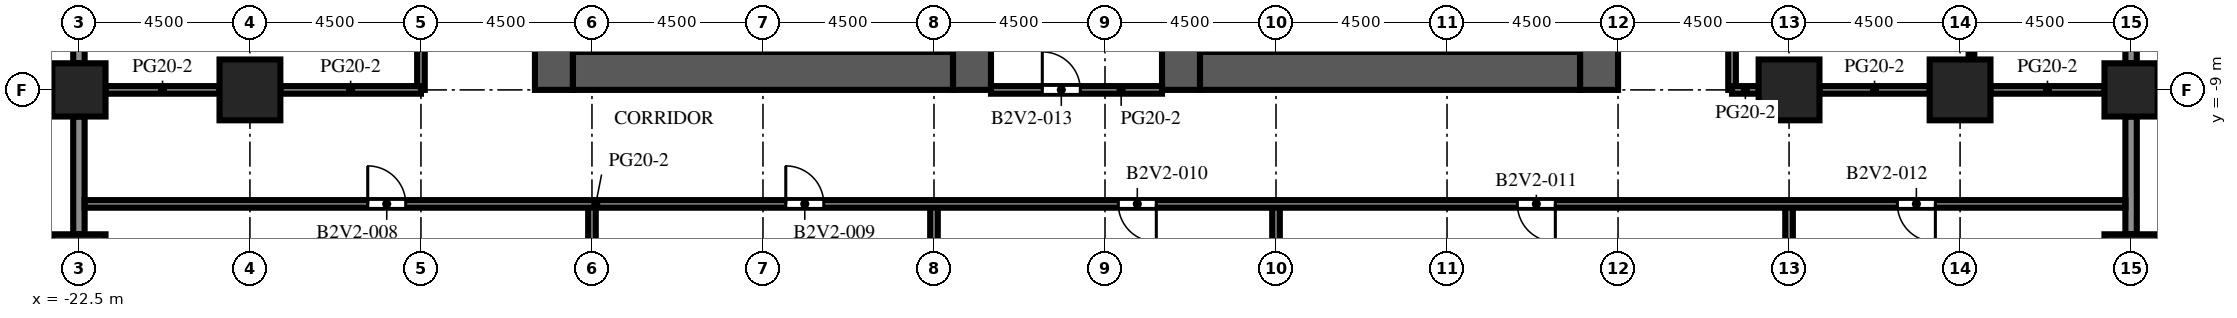
"""IFC4 building model, lengths in metres.
Left out: names, types, materials, properties, quantities, classifications, styles, units other than length and angle.
Written with IfcOpenShell. Run it as: python <this file> out.ifc"""

import sys

from ifc_helpers import new_model, si_unit, direction, frame, frame_2d, origin, origin_2d, place, context, subcontext, project, spatial, rectangle, extrude, element, fill, save


model = new_model("IFC4")
c1 = context("Model", 3, precision=1e-05, world=origin(), true_north=direction((0.0, 1.0)))
c2 = subcontext(c1, "Body", "Model", "MODEL_VIEW")
j1 = project(units=[si_unit("LENGTHUNIT", "METRE"), si_unit("PLANEANGLEUNIT", "RADIAN")], contexts=[c1])
p1 = place(None, origin())
s1 = spatial("IfcSite", under=j1, at=p1, CompositionType="ELEMENT")
p2 = place(p1, origin())
s2 = spatial("IfcBuilding", under=s1, at=p2, CompositionType="ELEMENT")
p3 = place(p2, frame((0.0, 0.0, 66.5)))
s3 = spatial("IfcBuildingStorey", under=s2, at=p3, CompositionType="ELEMENT", Elevation=66.5)
for number, where, z_axis, x_axis in (
    (1, (-22.5, -13.5, 0.0), (0.0, 0.0, 1.0), (1.0, 0.0, 0.0)),
    (2, (-22.5, -9.0, 0.0), (0.0, 0.0, 1.0), (1.0, 0.0, 0.0)),
    (3, (31.5, -13.5, 0.0), (0.0, 0.0, 1.0), (1.0, 0.0, 0.0)),
    (4, (31.5, -9.0, 0.0), (0.0, 0.0, 1.0), (1.0, 0.0, 0.0)),
):
    element("IfcColumn", number, at=place(p3, frame(where, z_axis=z_axis, x_axis=x_axis)), inside=s3, PredefinedType="COLUMN", context=c2, shape_type="SweptSolid", body=[
        extrude(rectangle(XDim=1.4, YDim=1.4, at=origin_2d()), origin(), (0.0, 0.0, 1.0), 4.1),
    ])
for number, where, z_axis, x_axis in (
    (5, (-18.0, -9.0, 0.0), (0.0, 0.0, 1.0), (1.0, 0.0, 0.0)),
    (6, (22.5, -9.0, 0.0), (0.0, 0.0, 1.0), (1.0, 0.0, 0.0)),
    (7, (27.0, -9.0, 0.0), (0.0, 0.0, 1.0), (1.0, 0.0, 0.0)),
):
    element("IfcColumn", number, at=place(p3, frame(where, z_axis=z_axis, x_axis=x_axis)), inside=s3, PredefinedType="COLUMN", context=c2, shape_type="SweptSolid", body=[
        extrude(rectangle(XDim=1.6, YDim=1.6, at=origin_2d()), origin(), (0.0, 0.0, 1.0), 4.1),
    ])
p4 = place(p3, frame((-10.0, -9.0, 0.0), z_axis=(0.0, 0.0, 1.0), x_axis=(0.0, 1.0, 0.0)))
e8 = element("IfcWall", 8, at=p4, inside=s3, PredefinedType="SHEAR", context=c2, shape_type="SweptSolid", body=[
    extrude(rectangle(XDim=27.5, YDim=1.0, at=frame_2d((13.75, 0.0))), origin(), (0.0, 0.0, 1.0), 4.1),
])
p5 = place(p4, frame((12.55, 0.0, 0.0)))
e9 = element("IfcOpeningElement", 9, at=p5, cuts=e8, PredefinedType="OPENING", context=c2, shape_type="SweptSolid", body=[
    extrude(rectangle(XDim=2.4, YDim=2.4, at=frame_2d((1.2, 1.2))), frame((0.0, 0.51, 0.0), z_axis=(0.0, -1.0, 0.0), x_axis=(1.0, 0.0, 0.0)), (0.0, 0.0, 1.0), 1.02),
])
p6 = place(p4, frame((6.825, 0.0, 0.0)))
e10 = element("IfcOpeningElement", 10, at=p6, cuts=e8, PredefinedType="OPENING", context=c2, shape_type="SweptSolid", body=[
    extrude(rectangle(XDim=1.2, YDim=2.1, at=frame_2d((0.6, 1.05))), frame((0.0, 0.51, 0.0), z_axis=(0.0, -1.0, 0.0), x_axis=(1.0, 0.0, 0.0)), (0.0, 0.0, 1.0), 1.02),
])
p7 = place(p4, frame((19.475, 0.0, 0.0)))
e11 = element("IfcOpeningElement", 11, at=p7, cuts=e8, PredefinedType="OPENING", context=c2, shape_type="SweptSolid", body=[
    extrude(rectangle(XDim=1.2, YDim=2.1, at=frame_2d((0.6, 1.05))), frame((0.0, 0.51, 0.0), z_axis=(0.0, -1.0, 0.0), x_axis=(1.0, 0.0, 0.0)), (0.0, 0.0, 1.0), 1.02),
])
p8 = place(p3, frame((1.0, -9.0, 0.0), z_axis=(0.0, 0.0, 1.0), x_axis=(0.0, 1.0, 0.0)))
e12 = element("IfcWall", 12, at=p8, inside=s3, PredefinedType="SHEAR", context=c2, shape_type="SweptSolid", body=[
    extrude(rectangle(XDim=27.5, YDim=1.0, at=frame_2d((13.75, 0.0))), origin(), (0.0, 0.0, 1.0), 4.1),
])
p9 = place(p8, frame((12.55, 0.0, 0.0)))
e13 = element("IfcOpeningElement", 13, at=p9, cuts=e12, PredefinedType="OPENING", context=c2, shape_type="SweptSolid", body=[
    extrude(rectangle(XDim=2.4, YDim=2.4, at=frame_2d((1.2, 1.2))), frame((0.0, 0.51, 0.0), z_axis=(0.0, -1.0, 0.0), x_axis=(1.0, 0.0, 0.0)), (0.0, 0.0, 1.0), 1.02),
])
p10 = place(p8, frame((5.55, 0.0, 0.0)))
e14 = element("IfcOpeningElement", 14, at=p10, cuts=e12, PredefinedType="OPENING", context=c2, shape_type="SweptSolid", body=[
    extrude(rectangle(XDim=0.905, YDim=2.1, at=frame_2d((0.453, 1.05))), frame((0.0, 0.51, 0.0), z_axis=(0.0, -1.0, 0.0), x_axis=(1.0, 0.0, 0.0)), (0.0, 0.0, 1.0), 1.02),
])
p11 = place(p8, frame((23.363, 0.0, 0.0)))
e15 = element("IfcOpeningElement", 15, at=p11, cuts=e12, PredefinedType="OPENING", context=c2, shape_type="SweptSolid", body=[
    extrude(rectangle(XDim=1.2, YDim=2.1, at=frame_2d((0.6, 1.05))), frame((0.0, 0.51, 0.0), z_axis=(0.0, -1.0, 0.0), x_axis=(1.0, 0.0, 0.0)), (0.0, 0.0, 1.0), 1.02),
])
p12 = place(p3, frame((-9.5, -8.5, 0.0), z_axis=(0.0, 0.0, 1.0), x_axis=(1.0, 0.0, 0.0)))
e16 = element("IfcWall", 16, at=p12, inside=s3, PredefinedType="SHEAR", context=c2, shape_type="SweptSolid", body=[
    extrude(rectangle(XDim=10.0, YDim=1.0, at=frame_2d((5.0, 0.0))), origin(), (0.0, 0.0, 1.0), 4.1),
])
p13 = place(p3, frame((6.5, -9.0, 0.0), z_axis=(0.0, 0.0, 1.0), x_axis=(0.0, 1.0, 0.0)))
e17 = element("IfcWall", 17, at=p13, inside=s3, PredefinedType="SHEAR", context=c2, shape_type="SweptSolid", body=[
    extrude(rectangle(XDim=27.5, YDim=1.0, at=frame_2d((13.75, 0.0))), origin(), (0.0, 0.0, 1.0), 4.1),
])
p14 = place(p13, frame((12.55, 0.0, 0.0)))
e18 = element("IfcOpeningElement", 18, at=p14, cuts=e17, PredefinedType="OPENING", context=c2, shape_type="SweptSolid", body=[
    extrude(rectangle(XDim=2.4, YDim=2.4, at=frame_2d((1.2, 1.2))), frame((0.0, 0.51, 0.0), z_axis=(0.0, -1.0, 0.0), x_axis=(1.0, 0.0, 0.0)), (0.0, 0.0, 1.0), 1.02),
])
p15 = place(p13, frame((5.55, 0.0, 0.0)))
e19 = element("IfcOpeningElement", 19, at=p15, cuts=e17, PredefinedType="OPENING", context=c2, shape_type="SweptSolid", body=[
    extrude(rectangle(XDim=0.905, YDim=2.1, at=frame_2d((0.453, 1.05))), frame((0.0, 0.51, 0.0), z_axis=(0.0, -1.0, 0.0), x_axis=(1.0, 0.0, 0.0)), (0.0, 0.0, 1.0), 1.02),
])
p16 = place(p13, frame((23.363, 0.0, 0.0)))
e20 = element("IfcOpeningElement", 20, at=p16, cuts=e17, PredefinedType="OPENING", context=c2, shape_type="SweptSolid", body=[
    extrude(rectangle(XDim=1.2, YDim=2.1, at=frame_2d((0.6, 1.05))), frame((0.0, 0.51, 0.0), z_axis=(0.0, -1.0, 0.0), x_axis=(1.0, 0.0, 0.0)), (0.0, 0.0, 1.0), 1.02),
])
p17 = place(p3, frame((17.5, -9.0, 0.0), z_axis=(0.0, 0.0, 1.0), x_axis=(0.0, 1.0, 0.0)))
e21 = element("IfcWall", 21, at=p17, inside=s3, PredefinedType="SHEAR", context=c2, shape_type="SweptSolid", body=[
    extrude(rectangle(XDim=27.5, YDim=1.0, at=frame_2d((13.75, 0.0))), origin(), (0.0, 0.0, 1.0), 4.1),
])
p18 = place(p17, frame((12.55, 0.0, 0.0)))
e22 = element("IfcOpeningElement", 22, at=p18, cuts=e21, PredefinedType="OPENING", context=c2, shape_type="SweptSolid", body=[
    extrude(rectangle(XDim=2.4, YDim=2.4, at=frame_2d((1.2, 1.2))), frame((0.0, 0.51, 0.0), z_axis=(0.0, -1.0, 0.0), x_axis=(1.0, 0.0, 0.0)), (0.0, 0.0, 1.0), 1.02),
])
p19 = place(p17, frame((6.825, 0.0, 0.0)))
e23 = element("IfcOpeningElement", 23, at=p19, cuts=e21, PredefinedType="OPENING", context=c2, shape_type="SweptSolid", body=[
    extrude(rectangle(XDim=1.2, YDim=2.1, at=frame_2d((0.6, 1.05))), frame((0.0, 0.51, 0.0), z_axis=(0.0, -1.0, 0.0), x_axis=(1.0, 0.0, 0.0)), (0.0, 0.0, 1.0), 1.02),
])
p20 = place(p17, frame((19.475, 0.0, 0.0)))
e24 = element("IfcOpeningElement", 24, at=p20, cuts=e21, PredefinedType="OPENING", context=c2, shape_type="SweptSolid", body=[
    extrude(rectangle(XDim=1.2, YDim=2.1, at=frame_2d((0.6, 1.05))), frame((0.0, 0.51, 0.0), z_axis=(0.0, -1.0, 0.0), x_axis=(1.0, 0.0, 0.0)), (0.0, 0.0, 1.0), 1.02),
])
p21 = place(p3, frame((7.0, -8.5, 0.0), z_axis=(0.0, 0.0, 1.0), x_axis=(1.0, 0.0, 0.0)))
e25 = element("IfcWall", 25, at=p21, inside=s3, PredefinedType="SHEAR", context=c2, shape_type="SweptSolid", body=[
    extrude(rectangle(XDim=10.0, YDim=1.0, at=frame_2d((5.0, 0.0))), origin(), (0.0, 0.0, 1.0), 4.1),
])
for number, where, z_axis, x_axis in (
    (26, (31.5, -9.7, 0.0), (0.0, 0.0, 1.0), (0.0, -1.0, 0.0)),
    (27, (31.5, -5.2, 0.0), (0.0, 0.0, 1.0), (0.0, -1.0, 0.0)),
    (28, (-22.5, -8.3, 0.0), (0.0, 0.0, 1.0), (0.0, 1.0, 0.0)),
    (29, (-22.5, -12.8, 0.0), (0.0, 0.0, 1.0), (0.0, 1.0, 0.0)),
):
    element("IfcWall", number, at=place(p3, frame(where, z_axis=z_axis, x_axis=x_axis)), inside=s3, PredefinedType="SOLIDWALL", context=c2, shape_type="SweptSolid", body=[
        extrude(rectangle(XDim=3.1, YDim=0.3, at=frame_2d((1.55, 0.0))), origin(), (0.0, 0.0, 1.0), 2.6),
    ])
p22 = place(p3, frame((-13.5, -9.0, 0.0), z_axis=(0.0, 0.0, 1.0), x_axis=(0.0, 1.0, 0.0)))
e30 = element("IfcWall", 30, at=p22, inside=s3, PredefinedType="PARTITIONING", context=c2, shape_type="SweptSolid", body=[
    extrude(rectangle(XDim=27.5, YDim=0.2, at=frame_2d((13.75, 0.0))), origin(), (0.0, 0.0, 1.0), 3.5),
])
p23 = place(p22, frame((4.85, 0.0, 0.0)))
e31 = element("IfcOpeningElement", 31, at=p23, cuts=e30, PredefinedType="OPENING", context=c2, shape_type="SweptSolid", body=[
    extrude(rectangle(XDim=1.0, YDim=2.1, at=frame_2d((0.5, 1.05))), frame((0.0, 0.11, 0.0), z_axis=(0.0, -1.0, 0.0), x_axis=(1.0, 0.0, 0.0)), (0.0, 0.0, 1.0), 0.22),
])
p24 = place(p22, frame((16.35, 0.0, 0.0)))
e32 = element("IfcOpeningElement", 32, at=p24, cuts=e30, PredefinedType="OPENING", context=c2, shape_type="SweptSolid", body=[
    extrude(rectangle(XDim=1.0, YDim=2.1, at=frame_2d((0.5, 1.05))), frame((0.0, 0.11, 0.0), z_axis=(0.0, -1.0, 0.0), x_axis=(1.0, 0.0, 0.0)), (0.0, 0.0, 1.0), 0.22),
])
for number, where, z_axis, x_axis in (
    (33, (-9.0, -17.2, 0.0), (0.0, 0.0, 1.0), (0.0, 1.0, 0.0)),
    (34, (0.0, -17.2, 0.0), (0.0, 0.0, 1.0), (0.0, 1.0, 0.0)),
    (35, (9.0, -17.2, 0.0), (0.0, 0.0, 1.0), (0.0, 1.0, 0.0)),
):
    element("IfcWall", number, at=place(p3, frame(where, z_axis=z_axis, x_axis=x_axis)), inside=s3, PredefinedType="PARTITIONING", context=c2, shape_type="SweptSolid", body=[
        extrude(rectangle(XDim=5.2, YDim=0.2, at=frame_2d((2.6, 0.0))), origin(), (0.0, 0.0, 1.0), 3.5),
    ])
p25 = place(p3, frame((21.0, 18.5, 0.0), z_axis=(0.0, 0.0, 1.0), x_axis=(0.0, -1.0, 0.0)))
e36 = element("IfcWall", 36, at=p25, inside=s3, PredefinedType="PARTITIONING", context=c2, shape_type="SweptSolid", body=[
    extrude(rectangle(XDim=27.5, YDim=0.2, at=frame_2d((13.75, 0.0))), origin(), (0.0, 0.0, 1.0), 3.5),
])
p26 = place(p25, frame((19.4, 0.0, 0.0)))
e37 = element("IfcOpeningElement", 37, at=p26, cuts=e36, PredefinedType="OPENING", context=c2, shape_type="SweptSolid", body=[
    extrude(rectangle(XDim=1.0, YDim=2.1, at=frame_2d((0.5, 1.05))), frame((0.0, 0.11, 0.0), z_axis=(0.0, -1.0, 0.0), x_axis=(1.0, 0.0, 0.0)), (0.0, 0.0, 1.0), 0.22),
])
p27 = place(p25, frame((7.65, 0.0, 0.0)))
e38 = element("IfcOpeningElement", 38, at=p27, cuts=e36, PredefinedType="OPENING", context=c2, shape_type="SweptSolid", body=[
    extrude(rectangle(XDim=1.0, YDim=2.1, at=frame_2d((0.5, 1.05))), frame((0.0, 0.11, 0.0), z_axis=(0.0, -1.0, 0.0), x_axis=(1.0, 0.0, 0.0)), (0.0, 0.0, 1.0), 0.22),
])
p28 = place(p3, frame((22.5, -17.2, 0.0), z_axis=(0.0, 0.0, 1.0), x_axis=(0.0, 1.0, 0.0)))
e39 = element("IfcWall", 39, at=p28, inside=s3, PredefinedType="PARTITIONING", context=c2, shape_type="SweptSolid", body=[
    extrude(rectangle(XDim=5.2, YDim=0.2, at=frame_2d((2.6, 0.0))), origin(), (0.0, 0.0, 1.0), 3.5),
])
p29 = place(p3, frame((27.3, -0.8, 0.0), z_axis=(0.0, 0.0, 1.0), x_axis=(0.0, -1.0, 0.0)))
e40 = element("IfcWall", 40, at=p29, inside=s3, PredefinedType="PARTITIONING", context=c2, shape_type="SweptSolid", body=[
    extrude(rectangle(XDim=7.4, YDim=0.15, at=frame_2d((3.7, 0.0))), origin(), (0.0, 0.0, 1.0), 3.5),
])
p30 = place(p29, frame((0.1, 0.0, 0.0)))
e41 = element("IfcOpeningElement", 41, at=p30, cuts=e40, PredefinedType="OPENING", context=c2, shape_type="SweptSolid", body=[
    extrude(rectangle(XDim=1.0, YDim=2.1, at=frame_2d((0.5, 1.05))), frame((0.0, 0.085, 0.0), z_axis=(0.0, -1.0, 0.0), x_axis=(1.0, 0.0, 0.0)), (0.0, 0.0, 1.0), 0.17),
])
p31 = place(p3, frame((31.35, -12.0, 0.0), z_axis=(0.0, 0.0, 1.0), x_axis=(-1.0, 0.0, 0.0)))
e42 = element("IfcWall", 42, at=p31, inside=s3, PredefinedType="PARTITIONING", context=c2, shape_type="SweptSolid", body=[
    extrude(rectangle(XDim=53.7, YDim=0.2, at=frame_2d((26.85, 0.0))), origin(), (0.0, 0.0, 1.0), 3.5),
])
p32 = place(p31, frame((45.25, 0.0, 0.0)))
e43 = element("IfcOpeningElement", 43, at=p32, cuts=e42, PredefinedType="OPENING", context=c2, shape_type="SweptSolid", body=[
    extrude(rectangle(XDim=1.0, YDim=2.1, at=frame_2d((0.5, 1.05))), frame((0.0, 0.11, 0.0), z_axis=(0.0, -1.0, 0.0), x_axis=(1.0, 0.0, 0.0)), (0.0, 0.0, 1.0), 0.22),
])
p33 = place(p31, frame((34.25, 0.0, 0.0)))
e44 = element("IfcOpeningElement", 44, at=p33, cuts=e42, PredefinedType="OPENING", context=c2, shape_type="SweptSolid", body=[
    extrude(rectangle(XDim=1.0, YDim=2.1, at=frame_2d((0.5, 1.05))), frame((0.0, 0.11, 0.0), z_axis=(0.0, -1.0, 0.0), x_axis=(1.0, 0.0, 0.0)), (0.0, 0.0, 1.0), 0.22),
])
p34 = place(p31, frame((25.5, 0.0, 0.0)))
e45 = element("IfcOpeningElement", 45, at=p34, cuts=e42, PredefinedType="OPENING", context=c2, shape_type="SweptSolid", body=[
    extrude(rectangle(XDim=1.0, YDim=2.1, at=frame_2d((0.5, 1.05))), frame((0.0, 0.11, 0.0), z_axis=(0.0, -1.0, 0.0), x_axis=(1.0, 0.0, 0.0)), (0.0, 0.0, 1.0), 0.22),
])
p35 = place(p31, frame((15.0, 0.0, 0.0)))
e46 = element("IfcOpeningElement", 46, at=p35, cuts=e42, PredefinedType="OPENING", context=c2, shape_type="SweptSolid", body=[
    extrude(rectangle(XDim=1.0, YDim=2.1, at=frame_2d((0.5, 1.05))), frame((0.0, 0.11, 0.0), z_axis=(0.0, -1.0, 0.0), x_axis=(1.0, 0.0, 0.0)), (0.0, 0.0, 1.0), 0.22),
])
p36 = place(p31, frame((5.0, 0.0, 0.0)))
e47 = element("IfcOpeningElement", 47, at=p36, cuts=e42, PredefinedType="OPENING", context=c2, shape_type="SweptSolid", body=[
    extrude(rectangle(XDim=1.0, YDim=2.1, at=frame_2d((0.5, 1.05))), frame((0.0, 0.11, 0.0), z_axis=(0.0, -1.0, 0.0), x_axis=(1.0, 0.0, 0.0)), (0.0, 0.0, 1.0), 0.22),
])
p37 = place(p3, frame((-21.8, -9.0, 0.0), z_axis=(0.0, 0.0, 1.0), x_axis=(1.0, 0.0, 0.0)))
e48 = element("IfcWall", 48, at=p37, inside=s3, PredefinedType="PARTITIONING", context=c2, shape_type="SweptSolid", body=[
    extrude(rectangle(XDim=3.0, YDim=0.2, at=frame_2d((1.5, 0.0))), origin(), (0.0, 0.0, 1.0), 3.5),
])
p38 = place(p3, frame((-17.2, -9.0, 0.0), z_axis=(0.0, 0.0, 1.0), x_axis=(1.0, 0.0, 0.0)))
e49 = element("IfcWall", 49, at=p38, inside=s3, PredefinedType="PARTITIONING", context=c2, shape_type="SweptSolid", body=[
    extrude(rectangle(XDim=3.7, YDim=0.2, at=frame_2d((1.85, 0.0))), origin(), (0.0, 0.0, 1.0), 3.5),
])
p39 = place(p3, frame((1.5, -9.0, 0.0), z_axis=(0.0, 0.0, 1.0), x_axis=(1.0, 0.0, 0.0)))
e50 = element("IfcWall", 50, at=p39, inside=s3, PredefinedType="PARTITIONING", context=c2, shape_type="SweptSolid", body=[
    extrude(rectangle(XDim=4.5, YDim=0.2, at=frame_2d((2.25, 0.0))), origin(), (0.0, 0.0, 1.0), 3.5),
])
p40 = place(p39, frame((1.35, 0.0, 0.0)))
e51 = element("IfcOpeningElement", 51, at=p40, cuts=e50, PredefinedType="OPENING", context=c2, shape_type="SweptSolid", body=[
    extrude(rectangle(XDim=1.0, YDim=2.1, at=frame_2d((0.5, 1.05))), frame((0.0, 0.11, 0.0), z_axis=(0.0, -1.0, 0.0), x_axis=(1.0, 0.0, 0.0)), (0.0, 0.0, 1.0), 0.22),
])
p41 = place(p3, frame((21.0, -9.0, 0.0), z_axis=(0.0, 0.0, 1.0), x_axis=(1.0, 0.0, 0.0)))
e52 = element("IfcWall", 52, at=p41, inside=s3, PredefinedType="PARTITIONING", context=c2, shape_type="SweptSolid", body=[
    extrude(rectangle(XDim=0.7, YDim=0.2, at=frame_2d((0.35, 0.0))), origin(), (0.0, 0.0, 1.0), 3.5),
])
p42 = place(p3, frame((23.3, -9.0, 0.0), z_axis=(0.0, 0.0, 1.0), x_axis=(1.0, 0.0, 0.0)))
e53 = element("IfcWall", 53, at=p42, inside=s3, PredefinedType="PARTITIONING", context=c2, shape_type="SweptSolid", body=[
    extrude(rectangle(XDim=2.9, YDim=0.2, at=frame_2d((1.45, 0.0))), origin(), (0.0, 0.0, 1.0), 3.5),
])
p43 = place(p3, frame((27.8, -9.0, 0.0), z_axis=(0.0, 0.0, 1.0), x_axis=(1.0, 0.0, 0.0)))
e54 = element("IfcWall", 54, at=p43, inside=s3, PredefinedType="PARTITIONING", context=c2, shape_type="SweptSolid", body=[
    extrude(rectangle(XDim=3.0, YDim=0.2, at=frame_2d((1.5, 0.0))), origin(), (0.0, 0.0, 1.0), 3.5),
])
p44 = place(p32, origin())
e55 = element("IfcDoor", 55, at=p44, inside=s3, OperationType="SINGLE_SWING_RIGHT", PredefinedType="DOOR", context=c2, shape_type="SweptSolid", body=[
    extrude(rectangle(XDim=1.0, YDim=2.1, at=frame_2d((0.5, 1.05))), frame((0.0, 0.025, 0.0), z_axis=(0.0, -1.0, 0.0), x_axis=(1.0, 0.0, 0.0)), (0.0, 0.0, 1.0), 0.05),
])
fill(e43, e55)
p45 = place(p33, origin())
e56 = element("IfcDoor", 56, at=p45, inside=s3, OperationType="SINGLE_SWING_RIGHT", PredefinedType="DOOR", context=c2, shape_type="SweptSolid", body=[
    extrude(rectangle(XDim=1.0, YDim=2.1, at=frame_2d((0.5, 1.05))), frame((0.0, 0.025, 0.0), z_axis=(0.0, -1.0, 0.0), x_axis=(1.0, 0.0, 0.0)), (0.0, 0.0, 1.0), 0.05),
])
fill(e44, e56)
p46 = place(p34, origin())
e57 = element("IfcDoor", 57, at=p46, inside=s3, OperationType="SINGLE_SWING_LEFT", PredefinedType="DOOR", context=c2, shape_type="SweptSolid", body=[
    extrude(rectangle(XDim=1.0, YDim=2.1, at=frame_2d((0.5, 1.05))), frame((0.0, 0.025, 0.0), z_axis=(0.0, -1.0, 0.0), x_axis=(1.0, 0.0, 0.0)), (0.0, 0.0, 1.0), 0.05),
])
fill(e45, e57)
p47 = place(p35, origin())
e58 = element("IfcDoor", 58, at=p47, inside=s3, OperationType="SINGLE_SWING_LEFT", PredefinedType="DOOR", context=c2, shape_type="SweptSolid", body=[
    extrude(rectangle(XDim=1.0, YDim=2.1, at=frame_2d((0.5, 1.05))), frame((0.0, 0.025, 0.0), z_axis=(0.0, -1.0, 0.0), x_axis=(1.0, 0.0, 0.0)), (0.0, 0.0, 1.0), 0.05),
])
fill(e46, e58)
p48 = place(p36, origin())
e59 = element("IfcDoor", 59, at=p48, inside=s3, OperationType="SINGLE_SWING_LEFT", PredefinedType="DOOR", context=c2, shape_type="SweptSolid", body=[
    extrude(rectangle(XDim=1.0, YDim=2.1, at=frame_2d((0.5, 1.05))), frame((0.0, 0.025, 0.0), z_axis=(0.0, -1.0, 0.0), x_axis=(1.0, 0.0, 0.0)), (0.0, 0.0, 1.0), 0.05),
])
fill(e47, e59)
p49 = place(p40, origin())
e60 = element("IfcDoor", 60, at=p49, inside=s3, OperationType="SINGLE_SWING_LEFT", PredefinedType="DOOR", context=c2, shape_type="SweptSolid", body=[
    extrude(rectangle(XDim=1.0, YDim=2.1, at=frame_2d((0.5, 1.05))), frame((0.0, 0.025, 0.0), z_axis=(0.0, -1.0, 0.0), x_axis=(1.0, 0.0, 0.0)), (0.0, 0.0, 1.0), 0.05),
])
fill(e51, e60)
save(model, sys.argv[1])
